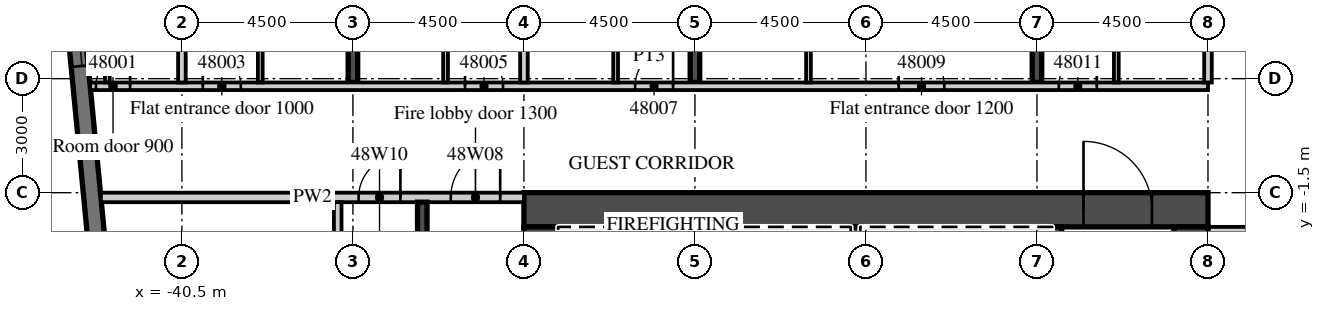
"""IFC4 building model, lengths in metres.
Left out: names, types, materials, properties, quantities, classifications, styles, units other than length and angle.
Written with IfcOpenShell. Run it as: python <this file> out.ifc"""

import sys

from ifc_helpers import new_model, si_unit, direction, frame, frame_2d, origin, place, context, subcontext, project, spatial, rectangle, extrude, element, fill, save


model = new_model("IFC4")
c1 = context("Model", 3, precision=1e-05, world=origin(), true_north=direction((0.0, 1.0)))
c2 = subcontext(c1, "Body", "Model", "MODEL_VIEW")
j1 = project(units=[si_unit("LENGTHUNIT", "METRE"), si_unit("PLANEANGLEUNIT", "RADIAN")], contexts=[c1])
p1 = place(None, origin())
s1 = spatial("IfcSite", under=j1, at=p1, CompositionType="ELEMENT")
p2 = place(p1, origin())
s2 = spatial("IfcBuilding", under=s1, at=p2, CompositionType="ELEMENT")
p3 = place(p2, frame((0.0, 0.0, 199.9)))
s3 = spatial("IfcBuildingStorey", under=s2, at=p3, CompositionType="ELEMENT", Elevation=199.9)
p4 = place(p3, frame((-36.0, 1.4, 0.0), z_axis=(0.0, 0.0, 1.0), x_axis=(0.0, 1.0, 0.0)))
e1 = element("IfcWall", 1, at=p4, inside=s3, PredefinedType="SHEAR", context=c2, shape_type="SweptSolid", body=[
    extrude(rectangle(XDim=15.401, YDim=0.25, at=frame_2d((7.701, 0.0))), origin(), (0.0, 0.0, 1.0), 3.3),
])
p5 = place(p3, frame((-27.0, 1.4, 0.0), z_axis=(0.0, 0.0, 1.0), x_axis=(0.0, 1.0, 0.0)))
e2 = element("IfcWall", 2, at=p5, inside=s3, PredefinedType="SHEAR", context=c2, shape_type="SweptSolid", body=[
    extrude(rectangle(XDim=16.268, YDim=0.25, at=frame_2d((8.134, 0.0))), origin(), (0.0, 0.0, 1.0), 3.3),
])
p6 = place(p3, frame((-18.0, 1.4, 0.0), z_axis=(0.0, 0.0, 1.0), x_axis=(0.0, 1.0, 0.0)))
e3 = element("IfcWall", 3, at=p6, inside=s3, PredefinedType="SHEAR", context=c2, shape_type="SweptSolid", body=[
    extrude(rectangle(XDim=17.134, YDim=0.25, at=frame_2d((8.567, 0.0))), origin(), (0.0, 0.0, 1.0), 3.3),
])
p7 = place(p3, frame((-44.214, 12.466, 0.0), z_axis=(0.0, 0.0, 1.0), x_axis=(0.095847314626, -0.995396047952, 0.0)))
e4 = element("IfcWall", 4, at=p7, inside=s3, PredefinedType="SOLIDWALL", context=c2, shape_type="SweptSolid", body=[
    extrude(rectangle(XDim=34.0, YDim=0.45, at=frame_2d((17.0, 0.0))), origin(), (0.0, 0.0, 1.0), 3.02),
])
p8 = place(p7, frame((2.865, 0.0, 0.45)))
e5 = element("IfcOpeningElement", 5, at=p8, cuts=e4, PredefinedType="OPENING", context=c2, shape_type="SweptSolid", body=[
    extrude(rectangle(XDim=3.3, YDim=2.25, at=frame_2d((1.65, 1.125))), frame((0.0, 0.235, 0.0), z_axis=(0.0, -1.0, 0.0), x_axis=(1.0, 0.0, 0.0)), (0.0, 0.0, 1.0), 0.47),
])
p9 = place(p7, frame((7.386, 0.0, 0.45)))
e6 = element("IfcOpeningElement", 6, at=p9, cuts=e4, PredefinedType="OPENING", context=c2, shape_type="SweptSolid", body=[
    extrude(rectangle(XDim=3.3, YDim=2.25, at=frame_2d((1.65, 1.125))), frame((0.0, 0.235, 0.0), z_axis=(0.0, -1.0, 0.0), x_axis=(1.0, 0.0, 0.0)), (0.0, 0.0, 1.0), 0.47),
])
p10 = place(p3, frame((-42.913, 1.3, 0.0), z_axis=(0.0, 0.0, 1.0), x_axis=(1.0, 0.0, 0.0)))
e7 = element("IfcWall", 7, at=p10, inside=s3, PredefinedType="PARTITIONING", context=c2, shape_type="SweptSolid", body=[
    extrude(rectangle(XDim=29.413, YDim=0.2, at=frame_2d((14.707, 0.0))), origin(), (0.0, 0.0, 1.0), 3.02),
])
p11 = place(p10, frame((0.15, 0.0, 0.0)))
e8 = element("IfcOpeningElement", 8, at=p11, cuts=e7, PredefinedType="OPENING", context=c2, shape_type="SweptSolid", body=[
    extrude(rectangle(XDim=0.9, YDim=2.1, at=frame_2d((0.45, 1.05))), frame((0.0, 0.11, 0.0), z_axis=(0.0, -1.0, 0.0), x_axis=(1.0, 0.0, 0.0)), (0.0, 0.0, 1.0), 0.22),
])
p12 = place(p10, frame((2.963, 0.0, 0.0)))
e9 = element("IfcOpeningElement", 9, at=p12, cuts=e7, PredefinedType="OPENING", context=c2, shape_type="SweptSolid", body=[
    extrude(rectangle(XDim=1.0, YDim=2.1, at=frame_2d((0.5, 1.05))), frame((0.0, 0.11, 0.0), z_axis=(0.0, -1.0, 0.0), x_axis=(1.0, 0.0, 0.0)), (0.0, 0.0, 1.0), 0.22),
])
p13 = place(p10, frame((9.863, 0.0, 0.0)))
e10 = element("IfcOpeningElement", 10, at=p13, cuts=e7, PredefinedType="OPENING", context=c2, shape_type="SweptSolid", body=[
    extrude(rectangle(XDim=1.0, YDim=2.1, at=frame_2d((0.5, 1.05))), frame((0.0, 0.11, 0.0), z_axis=(0.0, -1.0, 0.0), x_axis=(1.0, 0.0, 0.0)), (0.0, 0.0, 1.0), 0.22),
])
p14 = place(p10, frame((14.338, 0.0, 0.0)))
e11 = element("IfcOpeningElement", 11, at=p14, cuts=e7, PredefinedType="OPENING", context=c2, shape_type="SweptSolid", body=[
    extrude(rectangle(XDim=1.0, YDim=2.1, at=frame_2d((0.5, 1.05))), frame((0.0, 0.11, 0.0), z_axis=(0.0, -1.0, 0.0), x_axis=(1.0, 0.0, 0.0)), (0.0, 0.0, 1.0), 0.22),
])
p15 = place(p10, frame((21.275, 0.0, 0.0)))
e12 = element("IfcOpeningElement", 12, at=p15, cuts=e7, PredefinedType="OPENING", context=c2, shape_type="SweptSolid", body=[
    extrude(rectangle(XDim=1.2, YDim=2.1, at=frame_2d((0.6, 1.05))), frame((0.0, 0.11, 0.0), z_axis=(0.0, -1.0, 0.0), x_axis=(1.0, 0.0, 0.0)), (0.0, 0.0, 1.0), 0.22),
])
p16 = place(p10, frame((25.488, 0.0, 0.0)))
e13 = element("IfcOpeningElement", 13, at=p16, cuts=e7, PredefinedType="OPENING", context=c2, shape_type="SweptSolid", body=[
    extrude(rectangle(XDim=1.0, YDim=2.1, at=frame_2d((0.5, 1.05))), frame((0.0, 0.11, 0.0), z_axis=(0.0, -1.0, 0.0), x_axis=(1.0, 0.0, 0.0)), (0.0, 0.0, 1.0), 0.22),
])
p17 = place(p3, frame((-40.5, 1.4, 0.0), z_axis=(0.0, 0.0, 1.0), x_axis=(0.0, 1.0, 0.0)))
e14 = element("IfcWall", 14, at=p17, inside=s3, PredefinedType="PARTITIONING", context=c2, shape_type="SweptSolid", body=[
    extrude(rectangle(XDim=14.99, YDim=0.2, at=frame_2d((7.495, 0.0))), origin(), (0.0, 0.0, 1.0), 3.02),
])
p18 = place(p3, frame((-42.462, 1.4, 0.0), z_axis=(0.0, 0.0, 1.0), x_axis=(0.0, 1.0, 0.0)))
e15 = element("IfcWall", 15, at=p18, inside=s3, PredefinedType="PARTITIONING", context=c2, shape_type="SweptSolid", body=[
    extrude(rectangle(XDim=4.028, YDim=0.125, at=frame_2d((2.014, 0.0))), origin(), (0.0, 0.0, 1.0), 3.02),
])
p19 = place(p18, frame((2.45, 0.0, 0.0)))
e16 = element("IfcOpeningElement", 16, at=p19, cuts=e15, PredefinedType="OPENING", context=c2, shape_type="SweptSolid", body=[
    extrude(rectangle(XDim=0.9, YDim=2.1, at=frame_2d((0.45, 1.05))), frame((0.0, 0.073, 0.0), z_axis=(0.0, -1.0, 0.0), x_axis=(1.0, 0.0, 0.0)), (0.0, 0.0, 1.0), 0.145),
])
p20 = place(p3, frame((-38.438, 1.4, 0.0), z_axis=(0.0, 0.0, 1.0), x_axis=(0.0, 1.0, 0.0)))
e17 = element("IfcWall", 17, at=p20, inside=s3, PredefinedType="PARTITIONING", context=c2, shape_type="SweptSolid", body=[
    extrude(rectangle(XDim=7.725, YDim=0.125, at=frame_2d((3.863, 0.0))), origin(), (0.0, 0.0, 1.0), 3.02),
])
p21 = place(p20, frame((2.45, 0.0, 0.0)))
e18 = element("IfcOpeningElement", 18, at=p21, cuts=e17, PredefinedType="OPENING", context=c2, shape_type="SweptSolid", body=[
    extrude(rectangle(XDim=0.9, YDim=2.1, at=frame_2d((0.45, 1.05))), frame((0.0, 0.073, 0.0), z_axis=(0.0, -1.0, 0.0), x_axis=(1.0, 0.0, 0.0)), (0.0, 0.0, 1.0), 0.145),
])
p22 = place(p3, frame((-31.5, 1.4, 0.0), z_axis=(0.0, 0.0, 1.0), x_axis=(0.0, 1.0, 0.0)))
e19 = element("IfcWall", 19, at=p22, inside=s3, PredefinedType="PARTITIONING", context=c2, shape_type="SweptSolid", body=[
    extrude(rectangle(XDim=15.856, YDim=0.2, at=frame_2d((7.928, 0.0))), origin(), (0.0, 0.0, 1.0), 3.02),
])
p23 = place(p3, frame((-33.562, 1.4, 0.0), z_axis=(0.0, 0.0, 1.0), x_axis=(0.0, 1.0, 0.0)))
e20 = element("IfcWall", 20, at=p23, inside=s3, PredefinedType="PARTITIONING", context=c2, shape_type="SweptSolid", body=[
    extrude(rectangle(XDim=7.725, YDim=0.125, at=frame_2d((3.863, 0.0))), origin(), (0.0, 0.0, 1.0), 3.02),
])
p24 = place(p23, frame((2.45, 0.0, 0.0)))
e21 = element("IfcOpeningElement", 21, at=p24, cuts=e20, PredefinedType="OPENING", context=c2, shape_type="SweptSolid", body=[
    extrude(rectangle(XDim=0.9, YDim=2.1, at=frame_2d((0.45, 1.05))), frame((0.0, 0.073, 0.0), z_axis=(0.0, -1.0, 0.0), x_axis=(1.0, 0.0, 0.0)), (0.0, 0.0, 1.0), 0.145),
])
p25 = place(p3, frame((-29.087, 1.4, 0.0), z_axis=(0.0, 0.0, 1.0), x_axis=(0.0, 1.0, 0.0)))
e22 = element("IfcWall", 22, at=p25, inside=s3, PredefinedType="PARTITIONING", context=c2, shape_type="SweptSolid", body=[
    extrude(rectangle(XDim=7.725, YDim=0.125, at=frame_2d((3.863, 0.0))), origin(), (0.0, 0.0, 1.0), 3.02),
])
p26 = place(p25, frame((2.45, 0.0, 0.0)))
e23 = element("IfcOpeningElement", 23, at=p26, cuts=e22, PredefinedType="OPENING", context=c2, shape_type="SweptSolid", body=[
    extrude(rectangle(XDim=0.9, YDim=2.1, at=frame_2d((0.45, 1.05))), frame((0.0, 0.073, 0.0), z_axis=(0.0, -1.0, 0.0), x_axis=(1.0, 0.0, 0.0)), (0.0, 0.0, 1.0), 0.145),
])
p27 = place(p3, frame((-24.012, 1.4, 0.0), z_axis=(0.0, 0.0, 1.0), x_axis=(0.0, 1.0, 0.0)))
e24 = element("IfcWall", 24, at=p27, inside=s3, PredefinedType="PARTITIONING", context=c2, shape_type="SweptSolid", body=[
    extrude(rectangle(XDim=7.725, YDim=0.125, at=frame_2d((3.863, 0.0))), origin(), (0.0, 0.0, 1.0), 3.02),
])
p28 = place(p27, frame((2.45, 0.0, 0.0)))
e25 = element("IfcOpeningElement", 25, at=p28, cuts=e24, PredefinedType="OPENING", context=c2, shape_type="SweptSolid", body=[
    extrude(rectangle(XDim=0.9, YDim=2.1, at=frame_2d((0.45, 1.05))), frame((0.0, 0.073, 0.0), z_axis=(0.0, -1.0, 0.0), x_axis=(1.0, 0.0, 0.0)), (0.0, 0.0, 1.0), 0.145),
])
p29 = place(p3, frame((-13.5, 1.4, 0.0), z_axis=(0.0, 0.0, 1.0), x_axis=(0.0, 1.0, 0.0)))
e26 = element("IfcWall", 26, at=p29, inside=s3, PredefinedType="PARTITIONING", context=c2, shape_type="SweptSolid", body=[
    extrude(rectangle(XDim=17.59, YDim=0.2, at=frame_2d((8.795, 0.0))), origin(), (0.0, 0.0, 1.0), 3.02),
])
p30 = place(p3, frame((-15.912, 1.4, 0.0), z_axis=(0.0, 0.0, 1.0), x_axis=(0.0, 1.0, 0.0)))
e27 = element("IfcWall", 27, at=p30, inside=s3, PredefinedType="PARTITIONING", context=c2, shape_type="SweptSolid", body=[
    extrude(rectangle(XDim=7.725, YDim=0.125, at=frame_2d((3.863, 0.0))), origin(), (0.0, 0.0, 1.0), 3.02),
])
p31 = place(p30, frame((2.45, 0.0, 0.0)))
e28 = element("IfcOpeningElement", 28, at=p31, cuts=e27, PredefinedType="OPENING", context=c2, shape_type="SweptSolid", body=[
    extrude(rectangle(XDim=0.9, YDim=2.1, at=frame_2d((0.45, 1.05))), frame((0.0, 0.073, 0.0), z_axis=(0.0, -1.0, 0.0), x_axis=(1.0, 0.0, 0.0)), (0.0, 0.0, 1.0), 0.145),
])
p32 = place(p3, frame((-13.5, -2.5, 0.0), z_axis=(0.0, 0.0, 1.0), x_axis=(1.0, 0.0, 0.0)))
e29 = element("IfcWall", 29, at=p32, inside=s3, PredefinedType="PARTITIONING", context=c2, shape_type="SweptSolid", body=[
    extrude(rectangle(XDim=27.0, YDim=0.2, at=frame_2d((13.5, 0.0))), origin(), (0.0, 0.0, 1.0), 3.02),
])
p33 = place(p32, frame((2.925, 0.0, 0.0)))
e30 = element("IfcOpeningElement", 30, at=p33, cuts=e29, PredefinedType="OPENING", context=c2, shape_type="SweptSolid", body=[
    extrude(rectangle(XDim=1.0, YDim=2.1, at=frame_2d((0.5, 1.05))), frame((0.0, 0.11, 0.0), z_axis=(0.0, -1.0, 0.0), x_axis=(1.0, 0.0, 0.0)), (0.0, 0.0, 1.0), 0.22),
])
p34 = place(p32, frame((5.075, 0.0, 0.0)))
e31 = element("IfcOpeningElement", 31, at=p34, cuts=e29, PredefinedType="OPENING", context=c2, shape_type="SweptSolid", body=[
    extrude(rectangle(XDim=1.0, YDim=2.1, at=frame_2d((0.5, 1.05))), frame((0.0, 0.11, 0.0), z_axis=(0.0, -1.0, 0.0), x_axis=(1.0, 0.0, 0.0)), (0.0, 0.0, 1.0), 0.22),
])
p35 = place(p32, frame((11.925, 0.0, 0.0)))
e32 = element("IfcOpeningElement", 32, at=p35, cuts=e29, PredefinedType="OPENING", context=c2, shape_type="SweptSolid", body=[
    extrude(rectangle(XDim=1.0, YDim=2.1, at=frame_2d((0.5, 1.05))), frame((0.0, 0.11, 0.0), z_axis=(0.0, -1.0, 0.0), x_axis=(1.0, 0.0, 0.0)), (0.0, 0.0, 1.0), 0.22),
])
p36 = place(p32, frame((15.938, 0.0, 0.0)))
e33 = element("IfcOpeningElement", 33, at=p36, cuts=e29, PredefinedType="OPENING", context=c2, shape_type="SweptSolid", body=[
    extrude(rectangle(XDim=1.2, YDim=2.1, at=frame_2d((0.6, 1.05))), frame((0.0, 0.11, 0.0), z_axis=(0.0, -1.0, 0.0), x_axis=(1.0, 0.0, 0.0)), (0.0, 0.0, 1.0), 0.22),
])
p37 = place(p32, frame((25.425, 0.0, 0.0)))
e34 = element("IfcOpeningElement", 34, at=p37, cuts=e29, PredefinedType="OPENING", context=c2, shape_type="SweptSolid", body=[
    extrude(rectangle(XDim=1.0, YDim=2.1, at=frame_2d((0.5, 1.05))), frame((0.0, 0.11, 0.0), z_axis=(0.0, -1.0, 0.0), x_axis=(1.0, 0.0, 0.0)), (0.0, 0.0, 1.0), 0.22),
])
p38 = place(p3, frame((-31.5, -1.95, 0.0), z_axis=(0.0, 0.0, 1.0), x_axis=(1.0, 0.0, 0.0)))
e35 = element("IfcWall", 35, at=p38, inside=s3, PredefinedType="SHEAR", context=c2, shape_type="SweptSolid", body=[
    extrude(rectangle(XDim=18.0, YDim=0.9, at=frame_2d((9.0, 0.0))), origin(), (0.0, 0.0, 1.0), 3.02),
])
p39 = place(p38, frame((14.725, 0.0, 0.0)))
e36 = element("IfcOpeningElement", 36, at=p39, cuts=e35, PredefinedType="OPENING", context=c2, shape_type="SweptSolid", body=[
    extrude(rectangle(XDim=1.8, YDim=2.1, at=frame_2d((0.9, 1.05))), frame((0.0, 0.46, 0.0), z_axis=(0.0, -1.0, 0.0), x_axis=(1.0, 0.0, 0.0)), (0.0, 0.0, 1.0), 0.92),
])
p40 = place(p3, frame((-31.05, -15.2, 0.0), z_axis=(0.0, 0.0, 1.0), x_axis=(0.0, 1.0, 0.0)))
e37 = element("IfcWall", 37, at=p40, inside=s3, PredefinedType="SHEAR", context=c2, shape_type="SweptSolid", body=[
    extrude(rectangle(XDim=12.8, YDim=0.9, at=frame_2d((6.4, 0.0))), origin(), (0.0, 0.0, 1.0), 3.02),
])
p41 = place(p40, frame((11.5, 0.0, 0.0)))
e38 = element("IfcOpeningElement", 38, at=p41, cuts=e37, PredefinedType="OPENING", context=c2, shape_type="SweptSolid", body=[
    extrude(rectangle(XDim=1.1, YDim=2.1, at=frame_2d((0.55, 1.05))), frame((0.0, 0.46, 0.0), z_axis=(0.0, -1.0, 0.0), x_axis=(1.0, 0.0, 0.0)), (0.0, 0.0, 1.0), 0.92),
])
p42 = place(p3, frame((-13.95, -14.6, 0.0), z_axis=(0.0, 0.0, 1.0), x_axis=(0.0, 1.0, 0.0)))
e39 = element("IfcWall", 39, at=p42, inside=s3, PredefinedType="SHEAR", context=c2, shape_type="SweptSolid", body=[
    extrude(rectangle(XDim=12.2, YDim=0.9, at=frame_2d((6.1, 0.0))), origin(), (0.0, 0.0, 1.0), 3.02),
])
p43 = place(p3, frame((-17.475, -5.55, 0.0), z_axis=(0.0, 0.0, 1.0), x_axis=(0.0, 1.0, 0.0)))
e40 = element("IfcWall", 40, at=p43, inside=s3, PredefinedType="SHEAR", context=c2, shape_type="SweptSolid", body=[
    extrude(rectangle(XDim=3.15, YDim=0.25, at=frame_2d((1.575, 0.0))), origin(), (0.0, 0.0, 1.0), 3.02),
])
for number, where, z_axis, x_axis in (
    (41, (-27.975, -5.3, 0.0), (0.0, 0.0, 1.0), (0.0, 1.0, 0.0)),
    (42, (-22.775, -5.3, 0.0), (0.0, 0.0, 1.0), (0.0, 1.0, 0.0)),
):
    element("IfcWall", number, at=place(p3, frame(where, z_axis=z_axis, x_axis=x_axis)), inside=s3, PredefinedType="SHEAR", context=c2, shape_type="SweptSolid", body=[
        extrude(rectangle(XDim=2.9, YDim=0.25, at=frame_2d((1.45, 0.0))), origin(), (0.0, 0.0, 1.0), 3.02),
    ])
p44 = place(p3, frame((-42.632, -1.625, 0.0), z_axis=(0.0, 0.0, 1.0), x_axis=(1.0, 0.0, 0.0)))
e43 = element("IfcWall", 43, at=p44, inside=s3, PredefinedType="PARTITIONING", context=c2, shape_type="SweptSolid", body=[
    extrude(rectangle(XDim=11.132, YDim=0.25, at=frame_2d((5.566, 0.0))), origin(), (0.0, 0.0, 1.0), 3.02),
])
p45 = place(p44, frame((9.207, 0.0, 0.0)))
e44 = element("IfcOpeningElement", 44, at=p45, cuts=e43, PredefinedType="OPENING", context=c2, shape_type="SweptSolid", body=[
    extrude(rectangle(XDim=1.3, YDim=2.1, at=frame_2d((0.65, 1.05))), frame((0.0, 0.135, 0.0), z_axis=(0.0, -1.0, 0.0), x_axis=(1.0, 0.0, 0.0)), (0.0, 0.0, 1.0), 0.27),
])
p46 = place(p44, frame((6.781, 0.0, 0.0)))
e45 = element("IfcOpeningElement", 45, at=p46, cuts=e43, PredefinedType="OPENING", context=c2, shape_type="SweptSolid", body=[
    extrude(rectangle(XDim=1.1, YDim=2.1, at=frame_2d((0.55, 1.05))), frame((0.0, 0.135, 0.0), z_axis=(0.0, -1.0, 0.0), x_axis=(1.0, 0.0, 0.0)), (0.0, 0.0, 1.0), 0.27),
])
p47 = place(p3, frame((-34.175, -10.1, 0.0), z_axis=(0.0, 0.0, 1.0), x_axis=(0.0, 1.0, 0.0)))
e46 = element("IfcWall", 46, at=p47, inside=s3, PredefinedType="SHEAR", context=c2, shape_type="SweptSolid", body=[
    extrude(rectangle(XDim=8.35, YDim=0.25, at=frame_2d((4.175, 0.0))), origin(), (0.0, 0.0, 1.0), 3.02),
])
p48 = place(p3, frame((-36.4, -17.7, 0.0), z_axis=(0.0, 0.0, 1.0), x_axis=(0.0, 1.0, 0.0)))
e47 = element("IfcWall", 47, at=p48, inside=s3, PredefinedType="PARTITIONING", context=c2, shape_type="SweptSolid", body=[
    extrude(rectangle(XDim=15.95, YDim=0.2, at=frame_2d((7.975, 0.0))), origin(), (0.0, 0.0, 1.0), 3.02),
])
p49 = place(p48, frame((0.35, 0.0, 0.0)))
e48 = element("IfcOpeningElement", 48, at=p49, cuts=e47, PredefinedType="OPENING", context=c2, shape_type="SweptSolid", body=[
    extrude(rectangle(XDim=0.9, YDim=2.1, at=frame_2d((0.45, 1.05))), frame((0.0, 0.11, 0.0), z_axis=(0.0, -1.0, 0.0), x_axis=(1.0, 0.0, 0.0)), (0.0, 0.0, 1.0), 0.22),
])
p50 = place(p9, origin())
e49 = element("IfcWindow", 49, at=p50, inside=s3, PartitioningType="SINGLE_PANEL", PredefinedType="WINDOW", context=c2, shape_type="SweptSolid", body=[
    extrude(rectangle(XDim=3.3, YDim=2.25, at=frame_2d((1.65, 1.125))), frame((0.0, 0.09, 0.0), z_axis=(0.0, -1.0, 0.0), x_axis=(1.0, 0.0, 0.0)), (0.0, 0.0, 1.0), 0.06),
])
fill(e6, e49)
p51 = place(p11, origin())
e50 = element("IfcDoor", 50, at=p51, inside=s3, OperationType="SINGLE_SWING_RIGHT", PredefinedType="DOOR", context=c2, shape_type="SweptSolid", body=[
    extrude(rectangle(XDim=0.9, YDim=2.1, at=frame_2d((0.45, 1.05))), frame((0.0, 0.025, 0.0), z_axis=(0.0, -1.0, 0.0), x_axis=(1.0, 0.0, 0.0)), (0.0, 0.0, 1.0), 0.05),
])
fill(e8, e50)
p52 = place(p12, origin())
e51 = element("IfcDoor", 51, at=p52, inside=s3, OperationType="SINGLE_SWING_LEFT", PredefinedType="DOOR", context=c2, shape_type="SweptSolid", body=[
    extrude(rectangle(XDim=1.0, YDim=2.1, at=frame_2d((0.5, 1.05))), frame((0.0, 0.025, 0.0), z_axis=(0.0, -1.0, 0.0), x_axis=(1.0, 0.0, 0.0)), (0.0, 0.0, 1.0), 0.05),
])
fill(e9, e51)
p53 = place(p13, origin())
e52 = element("IfcDoor", 52, at=p53, inside=s3, OperationType="SINGLE_SWING_LEFT", PredefinedType="DOOR", context=c2, shape_type="SweptSolid", body=[
    extrude(rectangle(XDim=1.0, YDim=2.1, at=frame_2d((0.5, 1.05))), frame((0.0, 0.025, 0.0), z_axis=(0.0, -1.0, 0.0), x_axis=(1.0, 0.0, 0.0)), (0.0, 0.0, 1.0), 0.05),
])
fill(e10, e52)
p54 = place(p14, origin())
e53 = element("IfcDoor", 53, at=p54, inside=s3, OperationType="SINGLE_SWING_RIGHT", PredefinedType="DOOR", context=c2, shape_type="SweptSolid", body=[
    extrude(rectangle(XDim=1.0, YDim=2.1, at=frame_2d((0.5, 1.05))), frame((0.0, 0.025, 0.0), z_axis=(0.0, -1.0, 0.0), x_axis=(1.0, 0.0, 0.0)), (0.0, 0.0, 1.0), 0.05),
])
fill(e11, e53)
p55 = place(p15, origin())
e54 = element("IfcDoor", 54, at=p55, inside=s3, OperationType="SINGLE_SWING_LEFT", PredefinedType="DOOR", context=c2, shape_type="SweptSolid", body=[
    extrude(rectangle(XDim=1.2, YDim=2.1, at=frame_2d((0.6, 1.05))), frame((0.0, 0.025, 0.0), z_axis=(0.0, -1.0, 0.0), x_axis=(1.0, 0.0, 0.0)), (0.0, 0.0, 1.0), 0.05),
])
fill(e12, e54)
p56 = place(p16, origin())
e55 = element("IfcDoor", 55, at=p56, inside=s3, OperationType="SINGLE_SWING_RIGHT", PredefinedType="DOOR", context=c2, shape_type="SweptSolid", body=[
    extrude(rectangle(XDim=1.0, YDim=2.1, at=frame_2d((0.5, 1.05))), frame((0.0, 0.025, 0.0), z_axis=(0.0, -1.0, 0.0), x_axis=(1.0, 0.0, 0.0)), (0.0, 0.0, 1.0), 0.05),
])
fill(e13, e55)
p57 = place(p39, origin())
e56 = element("IfcDoor", 56, at=p57, inside=s3, OperationType="DOUBLE_DOOR_DOUBLE_SWING", PredefinedType="DOOR", context=c2, shape_type="SweptSolid", body=[
    extrude(rectangle(XDim=1.8, YDim=2.1, at=frame_2d((0.9, 1.05))), frame((0.0, 0.025, 0.0), z_axis=(0.0, -1.0, 0.0), x_axis=(1.0, 0.0, 0.0)), (0.0, 0.0, 1.0), 0.05),
])
fill(e36, e56)
p58 = place(p45, origin())
e57 = element("IfcDoor", 57, at=p58, inside=s3, OperationType="SINGLE_SWING_RIGHT", PredefinedType="DOOR", context=c2, shape_type="SweptSolid", body=[
    extrude(rectangle(XDim=1.3, YDim=2.1, at=frame_2d((0.65, 1.05))), frame((0.0, 0.025, 0.0), z_axis=(0.0, -1.0, 0.0), x_axis=(1.0, 0.0, 0.0)), (0.0, 0.0, 1.0), 0.05),
])
fill(e44, e57)
p59 = place(p46, origin())
e58 = element("IfcDoor", 58, at=p59, inside=s3, OperationType="SINGLE_SWING_RIGHT", PredefinedType="DOOR", context=c2, shape_type="SweptSolid", body=[
    extrude(rectangle(XDim=1.1, YDim=2.1, at=frame_2d((0.55, 1.05))), frame((0.0, 0.025, 0.0), z_axis=(0.0, -1.0, 0.0), x_axis=(1.0, 0.0, 0.0)), (0.0, 0.0, 1.0), 0.05),
])
fill(e45, e58)
save(model, sys.argv[1])
